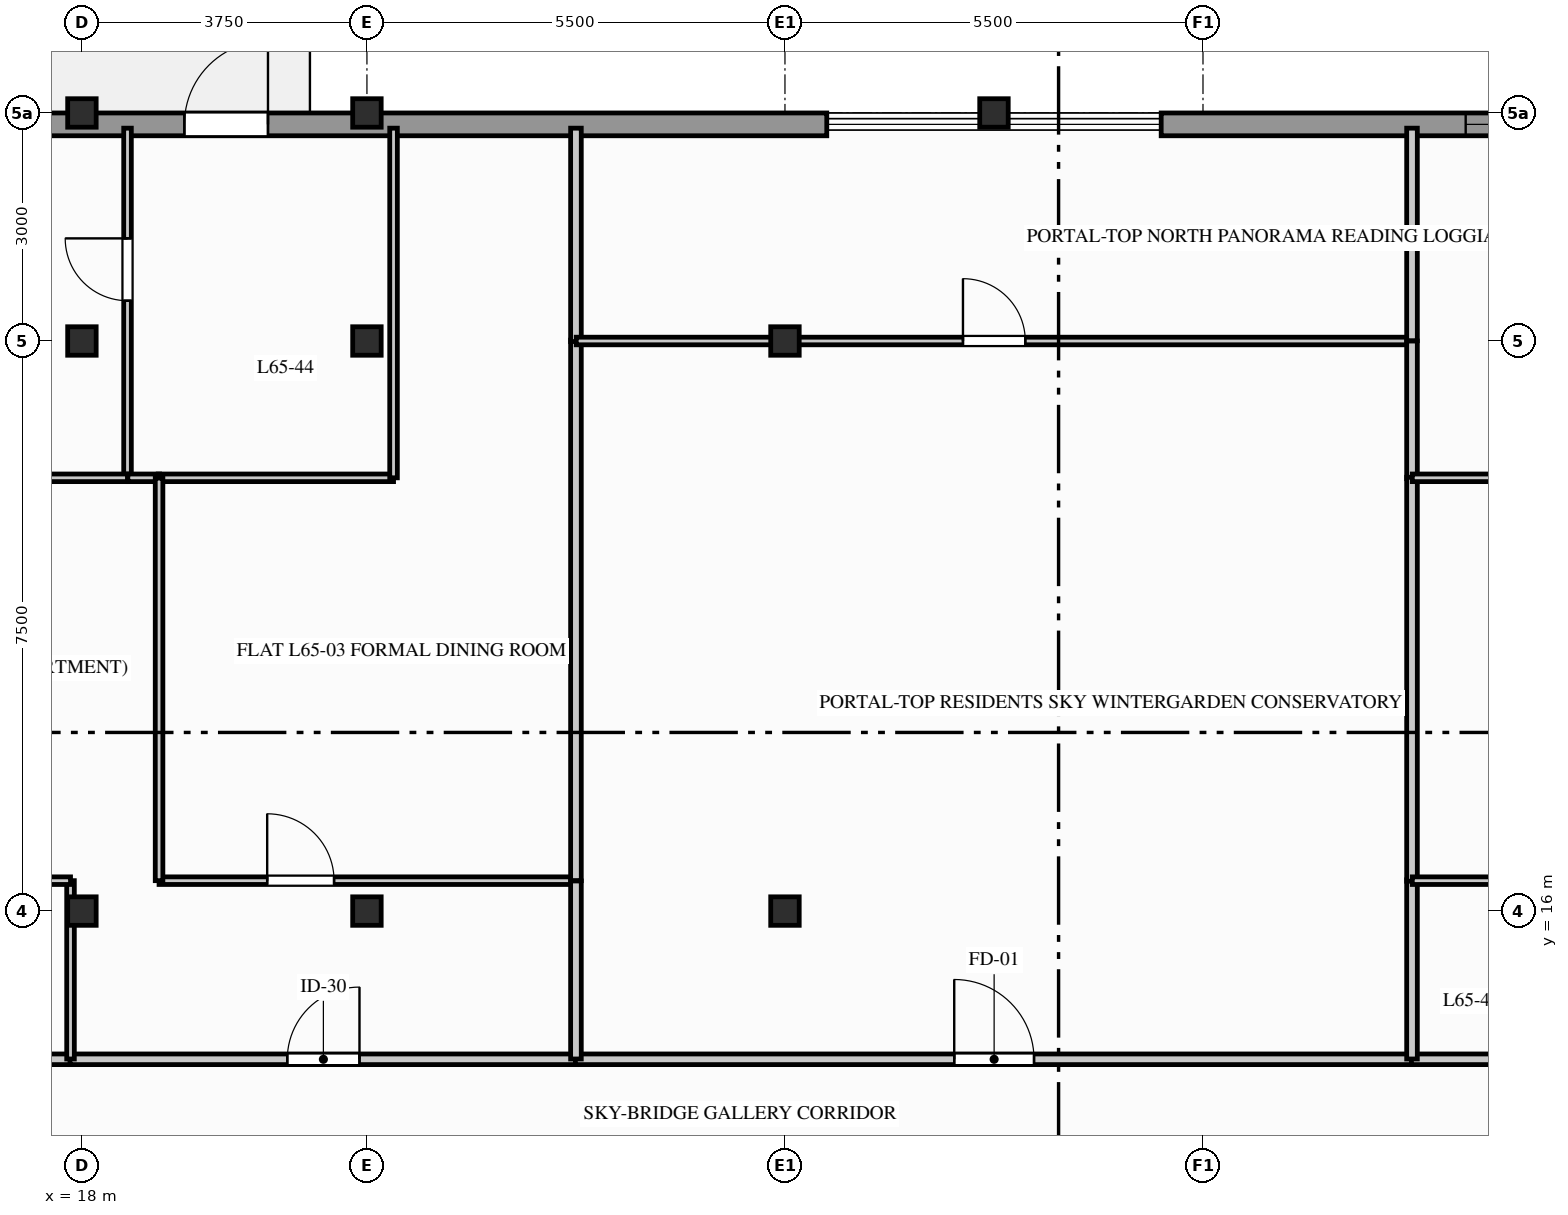
"""IFC4 building model, lengths in metres.
Left out: names, types, materials, properties, quantities, classifications, styles, units other than length and angle.
Written with IfcOpenShell. Run it as: python <this file> out.ifc"""

import sys

from ifc_helpers import new_model, si_unit, direction, frame, frame_2d, origin, origin_2d, place, context, subcontext, project, spatial, rectangle, i_section, extrude, element, fill, save


model = new_model("IFC4")
c1 = context("Model", 3, precision=1e-05, world=origin(), true_north=direction((0.0, 1.0)))
c2 = subcontext(c1, "Body", "Model", "MODEL_VIEW")
j1 = project(units=[si_unit("LENGTHUNIT", "METRE"), si_unit("PLANEANGLEUNIT", "RADIAN")], contexts=[c1])
p1 = place(None, origin())
s1 = spatial("IfcSite", under=j1, at=p1, CompositionType="ELEMENT")
p2 = place(p1, origin())
s2 = spatial("IfcBuilding", under=s1, at=p2, CompositionType="ELEMENT")
p3 = place(p2, frame((0.0, 0.0, 214.4)))
s3 = spatial("IfcBuildingStorey", under=s2, at=p3, CompositionType="ELEMENT", Elevation=214.4)
for number, where, z_axis, x_axis in (
    (1, (18.0, 16.0, 0.0), (0.0, 0.0, 1.0), (1.0, 0.0, 0.0)),
    (2, (18.0, 23.5, 0.0), (0.0, 0.0, 1.0), (1.0, 0.0, 0.0)),
    (3, (18.0, 26.5, 0.0), (0.0, 0.0, 1.0), (1.0, 0.0, 0.0)),
    (4, (21.75, 16.0, 0.0), (0.0, 0.0, 1.0), (1.0, 0.0, 0.0)),
    (5, (21.75, 23.5, 0.0), (0.0, 0.0, 1.0), (1.0, 0.0, 0.0)),
    (6, (21.75, 26.5, 0.0), (0.0, 0.0, 1.0), (1.0, 0.0, 0.0)),
):
    element("IfcColumn", number, at=place(p3, frame(where, z_axis=z_axis, x_axis=x_axis)), inside=s3, PredefinedType="COLUMN", context=c2, shape_type="SweptSolid", body=[
        extrude(i_section(OverallWidth=0.375, OverallDepth=0.375, WebThickness=0.017, FlangeThickness=0.027, FilletRadius=0.015, at=origin_2d()), origin(), (0.0, 0.0, 1.0), 3.6),
    ])
for number, where, z_axis, x_axis in (
    (7, (27.25, 16.0, -0.42), (0.0, 0.0, 1.0), (1.0, 0.0, 0.0)),
    (8, (27.25, 23.5, -0.42), (0.0, 0.0, 1.0), (1.0, 0.0, 0.0)),
    (9, (30.0, 26.5, -0.42), (0.0, 0.0, 1.0), (1.0, 0.0, 0.0)),
):
    element("IfcColumn", number, at=place(p3, frame(where, z_axis=z_axis, x_axis=x_axis)), inside=s3, PredefinedType="COLUMN", context=c2, shape_type="SweptSolid", body=[
        extrude(i_section(OverallWidth=0.375, OverallDepth=0.375, WebThickness=0.017, FlangeThickness=0.027, FilletRadius=0.015, at=origin_2d()), origin(), (0.0, 0.0, 1.0), 4.02),
    ])
p4 = place(p3, frame((11.45, 26.35, 0.0), z_axis=(0.0, 0.0, 1.0), x_axis=(1.0, 0.0, 0.0)))
e10 = element("IfcWall", 10, at=p4, inside=s3, PredefinedType="STANDARD", context=c2, shape_type="SweptSolid", body=[
    extrude(rectangle(XDim=16.35, YDim=0.3, at=frame_2d((8.175, 0.0))), origin(), (0.0, 0.0, 1.0), 2.454),
])
p5 = place(p4, frame((7.898, 0.0, 0.0)))
e11 = element("IfcOpeningElement", 11, at=p5, cuts=e10, PredefinedType="OPENING", context=c2, shape_type="SweptSolid", body=[
    extrude(rectangle(XDim=1.1, YDim=2.2, at=frame_2d((0.55, 1.1))), frame((0.0, 0.16, 0.0), z_axis=(0.0, -1.0, 0.0), x_axis=(1.0, 0.0, 0.0)), (0.0, 0.0, 1.0), 0.32),
])
p6 = place(p4, frame((1.37, 0.0, 0.284)))
e12 = element("IfcOpeningElement", 12, at=p6, cuts=e10, PredefinedType="OPENING", context=c2, shape_type="SweptSolid", body=[
    extrude(rectangle(XDim=2.1, YDim=1.95, at=frame_2d((1.05, 0.975))), frame((0.0, 0.16, 0.0), z_axis=(0.0, -1.0, 0.0), x_axis=(1.0, 0.0, 0.0)), (0.0, 0.0, 1.0), 0.32),
])
p7 = place(p4, frame((4.421, 0.0, 0.634)))
e13 = element("IfcOpeningElement", 13, at=p7, cuts=e10, PredefinedType="OPENING", context=c2, shape_type="SweptSolid", body=[
    extrude(rectangle(XDim=1.2, YDim=1.6, at=frame_2d((0.6, 0.8))), frame((0.0, 0.16, 0.0), z_axis=(0.0, -1.0, 0.0), x_axis=(1.0, 0.0, 0.0)), (0.0, 0.0, 1.0), 0.32),
])
p8 = place(p3, frame((32.2, 26.35, 0.0), z_axis=(0.0, 0.0, 1.0), x_axis=(1.0, 0.0, 0.0)))
e14 = element("IfcWall", 14, at=p8, inside=s3, PredefinedType="STANDARD", context=c2, shape_type="SweptSolid", body=[
    extrude(rectangle(XDim=16.35, YDim=0.3, at=frame_2d((8.175, 0.0))), origin(), (0.0, 0.0, 1.0), 2.454),
])
p9 = place(p8, frame((7.6, 0.0, 0.0)))
e15 = element("IfcOpeningElement", 15, at=p9, cuts=e14, PredefinedType="OPENING", context=c2, shape_type="SweptSolid", body=[
    extrude(rectangle(XDim=1.1, YDim=2.2, at=frame_2d((0.55, 1.1))), frame((0.0, 0.16, 0.0), z_axis=(0.0, -1.0, 0.0), x_axis=(1.0, 0.0, 0.0)), (0.0, 0.0, 1.0), 0.32),
])
p10 = place(p8, frame((11.121, 0.0, 0.284)))
e16 = element("IfcOpeningElement", 16, at=p10, cuts=e14, PredefinedType="OPENING", context=c2, shape_type="SweptSolid", body=[
    extrude(rectangle(XDim=2.1, YDim=1.95, at=frame_2d((1.05, 0.975))), frame((0.0, 0.16, 0.0), z_axis=(0.0, -1.0, 0.0), x_axis=(1.0, 0.0, 0.0)), (0.0, 0.0, 1.0), 0.32),
])
p11 = place(p8, frame((4.006, 0.0, 0.634)))
e17 = element("IfcOpeningElement", 17, at=p11, cuts=e14, PredefinedType="OPENING", context=c2, shape_type="SweptSolid", body=[
    extrude(rectangle(XDim=1.2, YDim=1.6, at=frame_2d((0.6, 0.8))), frame((0.0, 0.16, 0.0), z_axis=(0.0, -1.0, 0.0), x_axis=(1.0, 0.0, 0.0)), (0.0, 0.0, 1.0), 0.32),
])
p12 = place(p3, frame((14.643, 14.05, 0.0), z_axis=(0.0, 0.0, 1.0), x_axis=(1.0, 0.0, 0.0)))
e18 = element("IfcWall", 18, at=p12, inside=s3, PredefinedType="PARTITIONING", context=c2, shape_type="SweptSolid", body=[
    extrude(rectangle(XDim=3.219, YDim=0.14, at=frame_2d((1.609, 0.0))), origin(), (0.0, 0.0, 1.0), 2.685),
])
p13 = place(p3, frame((17.843, 14.05, 0.0), z_axis=(0.0, 0.0, 1.0), x_axis=(1.0, 0.0, 0.0)))
e19 = element("IfcWall", 19, at=p13, inside=s3, PredefinedType="PARTITIONING", context=c2, shape_type="SweptSolid", body=[
    extrude(rectangle(XDim=6.668, YDim=0.14, at=frame_2d((3.334, 0.0))), origin(), (0.0, 0.0, 1.0), 2.685),
])
p14 = place(p13, frame((2.859, 0.0, 0.0)))
e20 = element("IfcOpeningElement", 20, at=p14, cuts=e19, PredefinedType="OPENING", context=c2, shape_type="SweptSolid", body=[
    extrude(rectangle(XDim=0.95, YDim=2.05, at=frame_2d((0.475, 1.025))), frame((0.0, 0.08, 0.0), z_axis=(0.0, -1.0, 0.0), x_axis=(1.0, 0.0, 0.0)), (0.0, 0.0, 1.0), 0.16),
])
p15 = place(p3, frame((24.493, 14.05, 0.0), z_axis=(0.0, 0.0, 1.0), x_axis=(1.0, 0.0, 0.0)))
e21 = element("IfcWall", 21, at=p15, inside=s3, PredefinedType="PARTITIONING", context=c2, shape_type="SweptSolid", body=[
    extrude(rectangle(XDim=11.019, YDim=0.14, at=frame_2d((5.509, 0.0))), origin(), (0.0, 0.0, 1.0), 2.685),
])
p16 = place(p15, frame((4.984, 0.0, 0.0)))
e22 = element("IfcOpeningElement", 22, at=p16, cuts=e21, PredefinedType="OPENING", context=c2, shape_type="SweptSolid", body=[
    extrude(rectangle(XDim=1.05, YDim=2.06, at=frame_2d((0.525, 1.03))), frame((0.0, 0.08, 0.0), z_axis=(0.0, -1.0, 0.0), x_axis=(1.0, 0.0, 0.0)), (0.0, 0.0, 1.0), 0.16),
])
p17 = place(p3, frame((35.493, 14.05, 0.0), z_axis=(0.0, 0.0, 1.0), x_axis=(1.0, 0.0, 0.0)))
e23 = element("IfcWall", 23, at=p17, inside=s3, PredefinedType="PARTITIONING", context=c2, shape_type="SweptSolid", body=[
    extrude(rectangle(XDim=3.069, YDim=0.14, at=frame_2d((1.534, 0.0))), origin(), (0.0, 0.0, 1.0), 2.685),
])
p18 = place(p3, frame((17.85, 14.054, 0.0), z_axis=(0.0, 0.0, 1.0), x_axis=(0.0, 1.0, 0.0)))
e24 = element("IfcWall", 24, at=p18, inside=s3, PredefinedType="PARTITIONING", context=c2, shape_type="SweptSolid", body=[
    extrude(rectangle(XDim=2.346, YDim=0.1, at=frame_2d((1.173, 0.0))), origin(), (0.0, 0.0, 1.0), 2.685),
])
p19 = place(p3, frame((14.654, 16.4, 0.0), z_axis=(0.0, 0.0, 1.0), x_axis=(1.0, 0.0, 0.0)))
e25 = element("IfcWall", 25, at=p19, inside=s3, PredefinedType="PARTITIONING", context=c2, shape_type="SweptSolid", body=[
    extrude(rectangle(XDim=3.196, YDim=0.1, at=frame_2d((1.598, 0.0))), origin(), (0.0, 0.0, 1.0), 2.685),
])
p20 = place(p19, frame((1.158, 0.0, 0.0)))
e26 = element("IfcOpeningElement", 26, at=p20, cuts=e25, PredefinedType="OPENING", context=c2, shape_type="SweptSolid", body=[
    extrude(rectangle(XDim=0.88, YDim=2.04, at=frame_2d((0.44, 1.02))), frame((0.0, 0.06, 0.0), z_axis=(0.0, -1.0, 0.0), x_axis=(1.0, 0.0, 0.0)), (0.0, 0.0, 1.0), 0.12),
])
p21 = place(p3, frame((18.6, 21.7, 0.0), z_axis=(0.0, 0.0, 1.0), x_axis=(0.0, 1.0, 0.0)))
e27 = element("IfcWall", 27, at=p21, inside=s3, PredefinedType="PARTITIONING", context=c2, shape_type="SweptSolid", body=[
    extrude(rectangle(XDim=4.6, YDim=0.1, at=frame_2d((2.3, 0.0))), origin(), (0.0, 0.0, 1.0), 2.685),
])
p22 = place(p21, frame((2.33, 0.0, 0.0)))
e28 = element("IfcOpeningElement", 28, at=p22, cuts=e27, PredefinedType="OPENING", context=c2, shape_type="SweptSolid", body=[
    extrude(rectangle(XDim=0.82, YDim=2.02, at=frame_2d((0.41, 1.01))), frame((0.0, 0.06, 0.0), z_axis=(0.0, -1.0, 0.0), x_axis=(1.0, 0.0, 0.0)), (0.0, 0.0, 1.0), 0.12),
])
p23 = place(p3, frame((15.104, 21.7, 0.0), z_axis=(0.0, 0.0, 1.0), x_axis=(1.0, 0.0, 0.0)))
e29 = element("IfcWall", 29, at=p23, inside=s3, PredefinedType="PARTITIONING", context=c2, shape_type="SweptSolid", body=[
    extrude(rectangle(XDim=3.496, YDim=0.1, at=frame_2d((1.748, 0.0))), origin(), (0.0, 0.0, 1.0), 2.685),
])
p24 = place(p23, frame((1.308, 0.0, 0.0)))
e30 = element("IfcOpeningElement", 30, at=p24, cuts=e29, PredefinedType="OPENING", context=c2, shape_type="SweptSolid", body=[
    extrude(rectangle(XDim=0.88, YDim=2.04, at=frame_2d((0.44, 1.02))), frame((0.0, 0.06, 0.0), z_axis=(0.0, -1.0, 0.0), x_axis=(1.0, 0.0, 0.0)), (0.0, 0.0, 1.0), 0.12),
])
p25 = place(p3, frame((19.004, 21.7, 0.0), z_axis=(0.0, 0.0, 1.0), x_axis=(1.0, 0.0, 0.0)))
e31 = element("IfcWall", 31, at=p25, inside=s3, PredefinedType="PARTITIONING", context=c2, shape_type="SweptSolid", body=[
    extrude(rectangle(XDim=3.096, YDim=0.1, at=frame_2d((1.548, 0.0))), origin(), (0.0, 0.0, 1.0), 2.685),
])
p26 = place(p3, frame((22.1, 21.7, 0.0), z_axis=(0.0, 0.0, 1.0), x_axis=(0.0, 1.0, 0.0)))
e32 = element("IfcWall", 32, at=p26, inside=s3, PredefinedType="PARTITIONING", context=c2, shape_type="SweptSolid", body=[
    extrude(rectangle(XDim=4.6, YDim=0.1, at=frame_2d((2.3, 0.0))), origin(), (0.0, 0.0, 1.0), 2.454),
])
p27 = place(p3, frame((18.604, 21.7, 0.0), z_axis=(0.0, 0.0, 1.0), x_axis=(1.0, 0.0, 0.0)))
e33 = element("IfcWall", 33, at=p27, inside=s3, PredefinedType="PARTITIONING", context=c2, shape_type="SweptSolid", body=[
    extrude(rectangle(XDim=0.418, YDim=0.1, at=frame_2d((0.209, 0.0))), origin(), (0.0, 0.0, 1.0), 3.33),
])
p28 = place(p3, frame((19.015, 16.4, 0.0), z_axis=(0.0, 0.0, 1.0), x_axis=(1.0, 0.0, 0.0)))
e34 = element("IfcWall", 34, at=p28, inside=s3, PredefinedType="PARTITIONING", context=c2, shape_type="SweptSolid", body=[
    extrude(rectangle(XDim=5.485, YDim=0.1, at=frame_2d((2.743, 0.0))), origin(), (0.0, 0.0, 1.0), 2.685),
])
p29 = place(p28, frame((1.423, 0.0, 0.0)))
e35 = element("IfcOpeningElement", 35, at=p29, cuts=e34, PredefinedType="OPENING", context=c2, shape_type="SweptSolid", body=[
    extrude(rectangle(XDim=0.88, YDim=2.04, at=frame_2d((0.44, 1.02))), frame((0.0, 0.06, 0.0), z_axis=(0.0, -1.0, 0.0), x_axis=(1.0, 0.0, 0.0)), (0.0, 0.0, 1.0), 0.12),
])
p30 = place(p3, frame((19.015, 16.4, 0.0), z_axis=(0.0, 0.0, 1.0), x_axis=(0.0, 1.0, 0.0)))
e36 = element("IfcWall", 36, at=p30, inside=s3, PredefinedType="PARTITIONING", context=c2, shape_type="SweptSolid", body=[
    extrude(rectangle(XDim=5.296, YDim=0.1, at=frame_2d((2.648, 0.0))), origin(), (0.0, 0.0, 1.0), 2.899),
])
p31 = place(p3, frame((24.5, 16.4, 0.0), z_axis=(0.0, 0.0, 1.0), x_axis=(0.0, 1.0, 0.0)))
e37 = element("IfcWall", 37, at=p31, inside=s3, PredefinedType="PARTITIONING", context=c2, shape_type="SweptSolid", body=[
    extrude(rectangle(XDim=7.111, YDim=0.14, at=frame_2d((3.556, 0.0))), origin(), (0.0, 0.0, 1.0), 2.454),
])
p32 = place(p3, frame((24.5, 23.493, 0.0), z_axis=(0.0, 0.0, 1.0), x_axis=(0.0, 1.0, 0.0)))
e38 = element("IfcWall", 38, at=p32, inside=s3, PredefinedType="PARTITIONING", context=c2, shape_type="SweptSolid", body=[
    extrude(rectangle(XDim=2.807, YDim=0.14, at=frame_2d((1.404, 0.0))), origin(), (0.0, 0.0, 1.0), 2.454),
])
p33 = place(p3, frame((24.5, 14.054, 0.0), z_axis=(0.0, 0.0, 1.0), x_axis=(0.0, 1.0, 0.0)))
e39 = element("IfcWall", 39, at=p33, inside=s3, PredefinedType="PARTITIONING", context=c2, shape_type="SweptSolid", body=[
    extrude(rectangle(XDim=2.342, YDim=0.14, at=frame_2d((1.171, 0.0))), origin(), (0.0, 0.0, 1.0), 2.454),
])
p34 = place(p3, frame((24.504, 23.5, 0.0), z_axis=(0.0, 0.0, 1.0), x_axis=(1.0, 0.0, 0.0)))
e40 = element("IfcWall", 40, at=p34, inside=s3, PredefinedType="PARTITIONING", context=c2, shape_type="SweptSolid", body=[
    extrude(rectangle(XDim=10.996, YDim=0.1, at=frame_2d((5.498, 0.0))), origin(), (0.0, 0.0, 1.0), 2.454),
])
p35 = place(p34, frame((5.088, 0.0, 0.0)))
e41 = element("IfcOpeningElement", 41, at=p35, cuts=e40, PredefinedType="OPENING", context=c2, shape_type="SweptSolid", body=[
    extrude(rectangle(XDim=0.82, YDim=2.02, at=frame_2d((0.41, 1.01))), frame((0.0, 0.06, 0.0), z_axis=(0.0, -1.0, 0.0), x_axis=(1.0, 0.0, 0.0)), (0.0, 0.0, 1.0), 0.12),
])
p36 = place(p3, frame((35.5, 14.054, 0.0), z_axis=(0.0, 0.0, 1.0), x_axis=(0.0, 1.0, 0.0)))
e42 = element("IfcWall", 42, at=p36, inside=s3, PredefinedType="PARTITIONING", context=c2, shape_type="SweptSolid", body=[
    extrude(rectangle(XDim=2.357, YDim=0.14, at=frame_2d((1.179, 0.0))), origin(), (0.0, 0.0, 1.0), 2.454),
])
p37 = place(p3, frame((35.5, 21.689, 0.0), z_axis=(0.0, 0.0, 1.0), x_axis=(0.0, 1.0, 0.0)))
e43 = element("IfcWall", 43, at=p37, inside=s3, PredefinedType="PARTITIONING", context=c2, shape_type="SweptSolid", body=[
    extrude(rectangle(XDim=1.811, YDim=0.14, at=frame_2d((0.906, 0.0))), origin(), (0.0, 0.0, 1.0), 2.454),
])
p38 = place(p3, frame((35.5, 16.393, 0.0), z_axis=(0.0, 0.0, 1.0), x_axis=(0.0, 1.0, 0.0)))
e44 = element("IfcWall", 44, at=p38, inside=s3, PredefinedType="PARTITIONING", context=c2, shape_type="SweptSolid", body=[
    extrude(rectangle(XDim=5.315, YDim=0.14, at=frame_2d((2.657, 0.0))), origin(), (0.0, 0.0, 1.0), 2.899),
])
p39 = place(p3, frame((35.5, 23.504, 0.0), z_axis=(0.0, 0.0, 1.0), x_axis=(0.0, 1.0, 0.0)))
e45 = element("IfcWall", 45, at=p39, inside=s3, PredefinedType="PARTITIONING", context=c2, shape_type="SweptSolid", body=[
    extrude(rectangle(XDim=2.796, YDim=0.14, at=frame_2d((1.398, 0.0))), origin(), (0.0, 0.0, 1.0), 2.454),
])
p40 = place(p3, frame((35.504, 16.4, 0.0), z_axis=(0.0, 0.0, 1.0), x_axis=(1.0, 0.0, 0.0)))
e46 = element("IfcWall", 46, at=p40, inside=s3, PredefinedType="PARTITIONING", context=c2, shape_type="SweptSolid", body=[
    extrude(rectangle(XDim=3.046, YDim=0.1, at=frame_2d((1.523, 0.0))), origin(), (0.0, 0.0, 1.0), 2.685),
])
p41 = place(p40, frame((1.113, 0.0, 0.0)))
e47 = element("IfcOpeningElement", 47, at=p41, cuts=e46, PredefinedType="OPENING", context=c2, shape_type="SweptSolid", body=[
    extrude(rectangle(XDim=0.82, YDim=2.02, at=frame_2d((0.41, 1.01))), frame((0.0, 0.06, 0.0), z_axis=(0.0, -1.0, 0.0), x_axis=(1.0, 0.0, 0.0)), (0.0, 0.0, 1.0), 0.12),
])
p42 = place(p3, frame((35.504, 21.7, 0.0), z_axis=(0.0, 0.0, 1.0), x_axis=(1.0, 0.0, 0.0)))
e48 = element("IfcWall", 48, at=p42, inside=s3, PredefinedType="PARTITIONING", context=c2, shape_type="SweptSolid", body=[
    extrude(rectangle(XDim=3.363, YDim=0.1, at=frame_2d((1.682, 0.0))), origin(), (0.0, 0.0, 1.0), 2.685),
])
p43 = place(p42, frame((1.241, 0.0, 0.0)))
e49 = element("IfcOpeningElement", 49, at=p43, cuts=e48, PredefinedType="OPENING", context=c2, shape_type="SweptSolid", body=[
    extrude(rectangle(XDim=0.88, YDim=2.04, at=frame_2d((0.44, 1.02))), frame((0.0, 0.06, 0.0), z_axis=(0.0, -1.0, 0.0), x_axis=(1.0, 0.0, 0.0)), (0.0, 0.0, 1.0), 0.12),
])
p44 = place(p5, origin())
e50 = element("IfcDoor", 50, at=p44, inside=s3, OperationType="SINGLE_SWING_RIGHT", PredefinedType="DOOR", context=c2, shape_type="SweptSolid", body=[
    extrude(rectangle(XDim=1.1, YDim=2.2, at=frame_2d((0.55, 1.1))), frame((0.0, 0.025, 0.0), z_axis=(0.0, -1.0, 0.0), x_axis=(1.0, 0.0, 0.0)), (0.0, 0.0, 1.0), 0.05),
])
fill(e11, e50)
p45 = place(p14, origin())
e51 = element("IfcDoor", 51, at=p45, inside=s3, OperationType="SINGLE_SWING_RIGHT", PredefinedType="DOOR", context=c2, shape_type="SweptSolid", body=[
    extrude(rectangle(XDim=0.95, YDim=2.05, at=frame_2d((0.475, 1.025))), frame((0.0, 0.025, 0.0), z_axis=(0.0, -1.0, 0.0), x_axis=(1.0, 0.0, 0.0)), (0.0, 0.0, 1.0), 0.05),
])
fill(e20, e51)
p46 = place(p16, origin())
e52 = element("IfcDoor", 52, at=p46, inside=s3, OperationType="SINGLE_SWING_LEFT", PredefinedType="DOOR", context=c2, shape_type="SweptSolid", body=[
    extrude(rectangle(XDim=1.05, YDim=2.06, at=frame_2d((0.525, 1.03))), frame((0.0, 0.025, 0.0), z_axis=(0.0, -1.0, 0.0), x_axis=(1.0, 0.0, 0.0)), (0.0, 0.0, 1.0), 0.05),
])
fill(e22, e52)
p47 = place(p29, origin())
e53 = element("IfcDoor", 53, at=p47, inside=s3, OperationType="SINGLE_SWING_LEFT", PredefinedType="DOOR", context=c2, shape_type="SweptSolid", body=[
    extrude(rectangle(XDim=0.88, YDim=2.04, at=frame_2d((0.44, 1.02))), frame((0.0, 0.025, 0.0), z_axis=(0.0, -1.0, 0.0), x_axis=(1.0, 0.0, 0.0)), (0.0, 0.0, 1.0), 0.05),
])
fill(e35, e53)
p48 = place(p22, origin())
e54 = element("IfcDoor", 54, at=p48, inside=s3, OperationType="SINGLE_SWING_RIGHT", PredefinedType="DOOR", context=c2, shape_type="SweptSolid", body=[
    extrude(rectangle(XDim=0.82, YDim=2.02, at=frame_2d((0.41, 1.01))), frame((0.0, 0.025, 0.0), z_axis=(0.0, -1.0, 0.0), x_axis=(1.0, 0.0, 0.0)), (0.0, 0.0, 1.0), 0.05),
])
fill(e28, e54)
p49 = place(p35, origin())
e55 = element("IfcDoor", 55, at=p49, inside=s3, OperationType="SINGLE_SWING_LEFT", PredefinedType="DOOR", context=c2, shape_type="SweptSolid", body=[
    extrude(rectangle(XDim=0.82, YDim=2.02, at=frame_2d((0.41, 1.01))), frame((0.0, 0.025, 0.0), z_axis=(0.0, -1.0, 0.0), x_axis=(1.0, 0.0, 0.0)), (0.0, 0.0, 1.0), 0.05),
])
fill(e41, e55)
p50 = place(p11, origin())
e56 = element("IfcWindow", 56, at=p50, inside=s3, PartitioningType="SINGLE_PANEL", PredefinedType="WINDOW", context=c2, shape_type="SweptSolid", body=[
    extrude(rectangle(XDim=1.2, YDim=1.6, at=frame_2d((0.6, 0.8))), frame((0.0, 0.03, 0.0), z_axis=(0.0, -1.0, 0.0), x_axis=(1.0, 0.0, 0.0)), (0.0, 0.0, 1.0), 0.06),
])
fill(e17, e56)
save(model, sys.argv[1])
